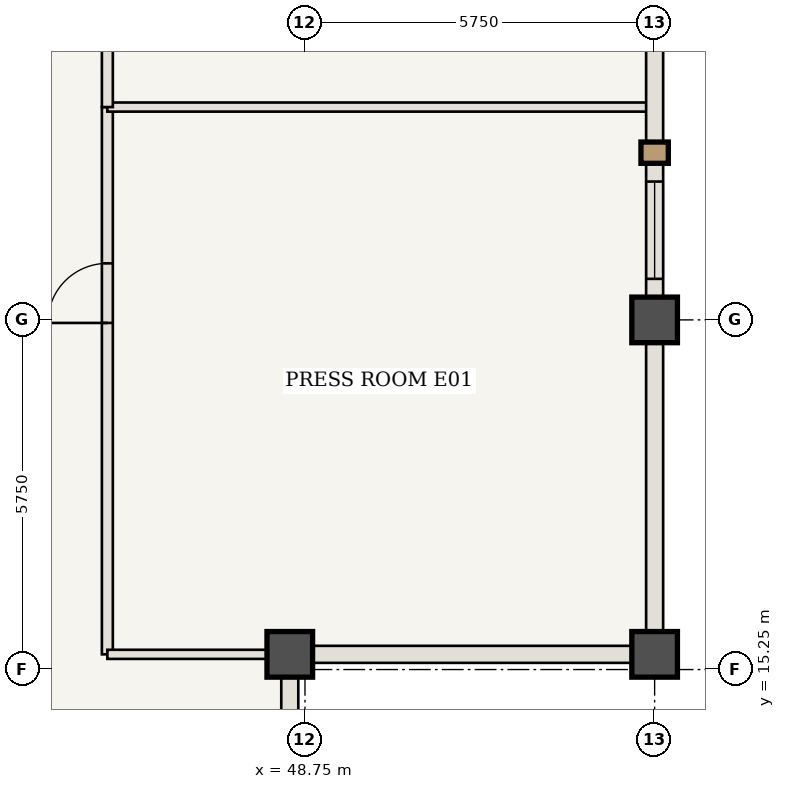
"""IFC4 building model, lengths in metres.
Left out: names, types, materials, properties, quantities, classifications, styles, units other than length and angle.
Written with IfcOpenShell. Run it as: python <this file> out.ifc"""

import sys

from ifc_helpers import new_model, si_unit, direction, frame, frame_2d, origin, origin_2d, place, context, subcontext, project, spatial, rectangle, extrude, element, fill, save


model = new_model("IFC4")
c1 = context("Model", 3, precision=1e-05, world=origin(), true_north=direction((0.0, 1.0)))
c2 = subcontext(c1, "Body", "Model", "MODEL_VIEW")
j1 = project(units=[si_unit("LENGTHUNIT", "METRE"), si_unit("PLANEANGLEUNIT", "RADIAN")], contexts=[c1])
p1 = place(None, origin())
s1 = spatial("IfcSite", under=j1, at=p1, CompositionType="ELEMENT")
p2 = place(p1, origin())
s2 = spatial("IfcBuilding", under=s1, at=p2, CompositionType="ELEMENT")
p3 = place(p2, frame((0.0, 0.0, 277.55)))
s3 = spatial("IfcBuildingStorey", under=s2, at=p3, CompositionType="ELEMENT", Elevation=277.55)
for number, where, z_axis, x_axis in (
    (1, (48.5, 15.5, 0.0), (0.0, 0.0, 1.0), (1.0, 0.0, 0.0)),
    (2, (54.5, 15.5, 0.0), (0.0, 0.0, 1.0), (1.0, 0.0, 0.0)),
    (3, (54.5, 21.0, 0.0), (0.0, 0.0, 1.0), (1.0, 0.0, 0.0)),
):
    element("IfcColumn", number, at=place(p3, frame(where, z_axis=z_axis, x_axis=x_axis)), inside=s3, PredefinedType="COLUMN", context=c2, shape_type="SweptSolid", body=[
        extrude(rectangle(XDim=0.75, YDim=0.75, at=origin_2d()), origin(), (0.0, 0.0, 1.0), 3.85),
    ])
p4 = place(p3, frame((45.5, 15.5, 0.0), z_axis=(0.0, 0.0, 1.0), x_axis=(0.0, 1.0, 0.0)))
e4 = element("IfcWall", 4, at=p4, inside=s3, PredefinedType="STANDARD", context=c2, shape_type="SweptSolid", body=[
    extrude(rectangle(XDim=9.0, YDim=0.18, at=frame_2d((4.5, 0.0))), origin(), (0.0, 0.0, 1.0), 3.685),
])
p5 = place(p4, frame((5.45, 0.0, 0.0)))
e5 = element("IfcOpeningElement", 5, at=p5, cuts=e4, PredefinedType="OPENING", context=c2, shape_type="SweptSolid", body=[
    extrude(rectangle(XDim=0.98, YDim=2.2, at=frame_2d((0.49, 1.1))), frame((0.0, 0.1, 0.0), z_axis=(0.0, -1.0, 0.0), x_axis=(1.0, 0.0, 0.0)), (0.0, 0.0, 1.0), 0.2),
])
p6 = place(p3, frame((45.5, 24.5, 0.0), z_axis=(0.0, 0.0, 1.0), x_axis=(1.0, 0.0, 0.0)))
e6 = element("IfcWall", 6, at=p6, inside=s3, PredefinedType="STANDARD", context=c2, shape_type="SweptSolid", body=[
    extrude(rectangle(XDim=8.94, YDim=0.15, at=frame_2d((4.47, 0.0))), origin(), (0.0, 0.0, 1.0), 3.685),
])
p7 = place(p3, frame((45.5, 24.5, 0.0), z_axis=(0.0, 0.0, 1.0), x_axis=(0.0, 1.0, 0.0)))
e7 = element("IfcWall", 7, at=p7, inside=s3, PredefinedType="STANDARD", context=c2, shape_type="SweptSolid", body=[
    extrude(rectangle(XDim=24.0, YDim=0.18, at=frame_2d((12.0, 0.0))), origin(), (0.0, 0.0, 1.0), 3.685),
])
p8 = place(p7, frame((11.5, 0.0, 0.0)))
e8 = element("IfcOpeningElement", 8, at=p8, cuts=e7, PredefinedType="OPENING", context=c2, shape_type="SweptSolid", body=[
    extrude(rectangle(XDim=0.98, YDim=2.2, at=frame_2d((0.49, 1.1))), frame((0.0, 0.1, 0.0), z_axis=(0.0, -1.0, 0.0), x_axis=(1.0, 0.0, 0.0)), (0.0, 0.0, 1.0), 0.2),
])
p9 = place(p3, frame((45.5, 15.5, 0.0), z_axis=(0.0, 0.0, 1.0), x_axis=(1.0, 0.0, 0.0)))
e9 = element("IfcWall", 9, at=p9, inside=s3, PredefinedType="STANDARD", context=c2, shape_type="SweptSolid", body=[
    extrude(rectangle(XDim=3.0, YDim=0.15, at=frame_2d((1.5, 0.0))), origin(), (0.0, 0.0, 1.0), 3.685),
])
p10 = place(p3, frame((54.5, 21.0, 0.0), z_axis=(0.0, 0.0, 1.0), x_axis=(0.0, -1.0, 0.0)))
e10 = element("IfcWall", 10, at=p10, inside=s3, PredefinedType="USERDEFINED", context=c2, shape_type="SweptSolid", body=[
    extrude(rectangle(XDim=5.5, YDim=0.28, at=frame_2d((2.75, 0.0))), origin(), (0.0, 0.0, 1.0), 2.985),
])
p11 = place(p3, frame((54.5, 26.5, 0.0), z_axis=(0.0, 0.0, 1.0), x_axis=(0.0, -1.0, 0.0)))
e11 = element("IfcWall", 11, at=p11, inside=s3, PredefinedType="USERDEFINED", context=c2, shape_type="SweptSolid", body=[
    extrude(rectangle(XDim=5.5, YDim=0.28, at=frame_2d((2.75, 0.0))), origin(), (0.0, 0.0, 1.0), 2.985),
])
p12 = place(p11, frame((3.225, 0.0, 0.85)))
e12 = element("IfcOpeningElement", 12, at=p12, cuts=e11, PredefinedType="OPENING", context=c2, shape_type="SweptSolid", body=[
    extrude(rectangle(XDim=1.6, YDim=1.935, at=frame_2d((0.8, 0.968))), frame((0.0, 0.15, 0.0), z_axis=(0.0, -1.0, 0.0), x_axis=(1.0, 0.0, 0.0)), (0.0, 0.0, 1.0), 0.3),
])
for number, where, z_axis, x_axis in (
    (13, (48.5, 15.5, 0.0), (0.0, 0.0, 1.0), (0.0, -1.0, 0.0)),
    (14, (54.5, 15.5, 0.0), (0.0, 0.0, 1.0), (-1.0, 0.0, 0.0)),
):
    element("IfcWall", number, at=place(p3, frame(where, z_axis=z_axis, x_axis=x_axis)), inside=s3, PredefinedType="USERDEFINED", context=c2, shape_type="SweptSolid", body=[
        extrude(rectangle(XDim=6.0, YDim=0.28, at=frame_2d((3.0, 0.0))), origin(), (0.0, 0.0, 1.0), 2.985),
    ])
p13 = place(p5, origin())
e15 = element("IfcDoor", 15, at=p13, inside=s3, OperationType="SINGLE_SWING_LEFT", PredefinedType="DOOR", context=c2, shape_type="SweptSolid", body=[
    extrude(rectangle(XDim=0.98, YDim=2.2, at=frame_2d((0.49, 1.1))), frame((0.0, 0.025, 0.0), z_axis=(0.0, -1.0, 0.0), x_axis=(1.0, 0.0, 0.0)), (0.0, 0.0, 1.0), 0.05),
])
fill(e5, e15)
p14 = place(p12, origin())
e16 = element("IfcWindow", 16, at=p14, inside=s3, PartitioningType="SINGLE_PANEL", PredefinedType="WINDOW", context=c2, shape_type="SweptSolid", body=[
    extrude(rectangle(XDim=1.6, YDim=1.935, at=frame_2d((0.8, 0.968))), frame((0.0, 0.03, 0.0), z_axis=(0.0, -1.0, 0.0), x_axis=(1.0, 0.0, 0.0)), (0.0, 0.0, 1.0), 0.06),
])
fill(e12, e16)
save(model, sys.argv[1])
